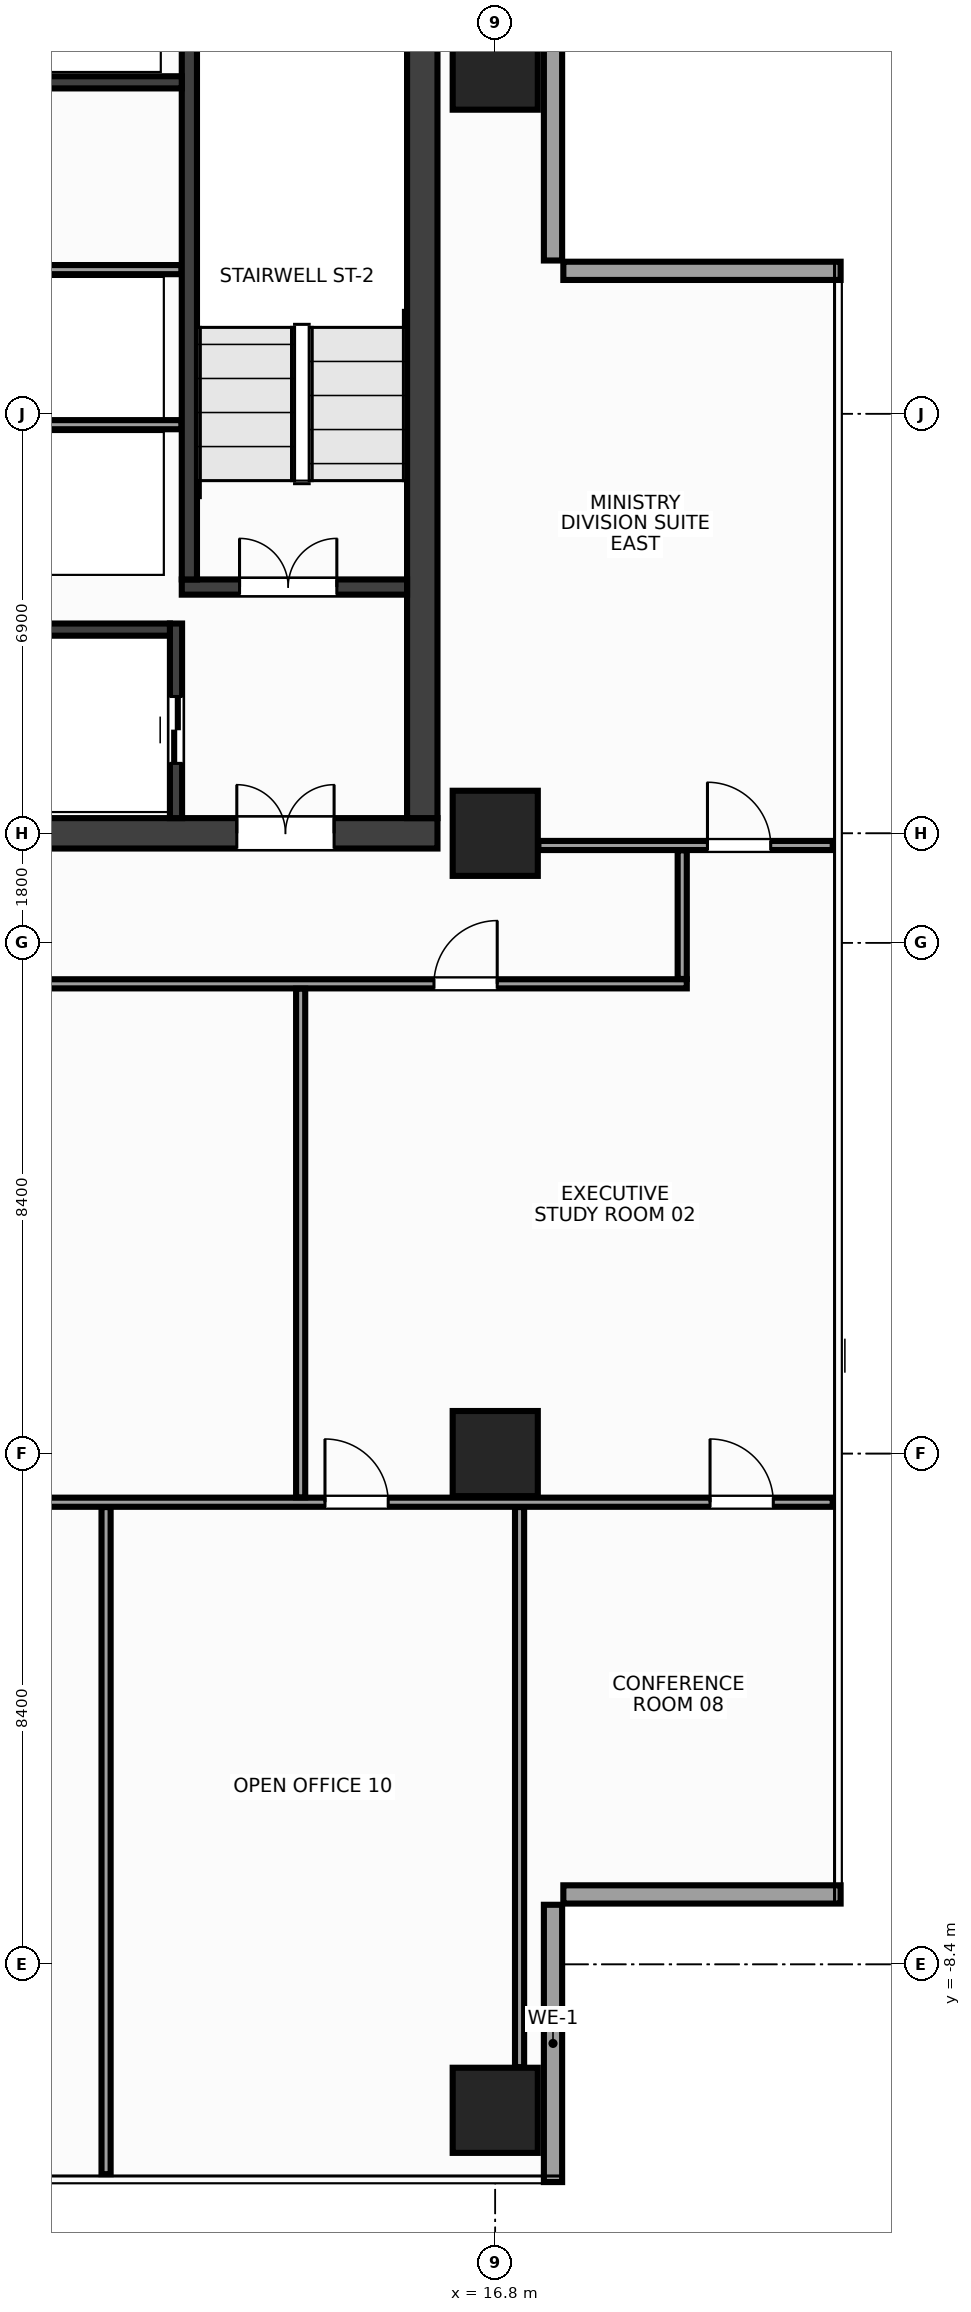
"""IFC4 building model, lengths in metres.
Left out: names, types, materials, properties, quantities, classifications, styles, units other than length and angle.
Written with IfcOpenShell. Run it as: python <this file> out.ifc"""

import sys

from ifc_helpers import new_model, si_unit, direction, frame, frame_2d, origin, origin_2d, place, context, subcontext, project, spatial, rectangle, extrude, source, transform, mapped, element, fill, save


model = new_model("IFC4")
c1 = context("Model", 3, precision=1e-05, world=origin(), true_north=direction((0.0, 1.0)))
c2 = subcontext(c1, "Body", "Model", "MODEL_VIEW")
j1 = project(units=[si_unit("LENGTHUNIT", "METRE"), si_unit("PLANEANGLEUNIT", "RADIAN")], contexts=[c1])
p1 = place(None, origin())
s1 = spatial("IfcSite", under=j1, at=p1, CompositionType="ELEMENT")
p2 = place(p1, origin())
s2 = spatial("IfcBuilding", under=s1, at=p2, CompositionType="ELEMENT")
p3 = place(p2, frame((0.0, 0.0, 250.4)))
s3 = spatial("IfcBuildingStorey", under=s2, at=p3, CompositionType="ELEMENT", Elevation=250.4)
m1 = source(origin(), c2, "Body", "SweptSolid", [
    extrude(rectangle(XDim=31.7, YDim=0.5, at=frame_2d((15.85, 0.0))), origin(), (0.0, 0.0, 1.0), 3.6),
])
p4 = place(p3, frame((-15.85, 10.2, 0.0), z_axis=(0.0, 0.0, 1.0), x_axis=(1.0, 0.0, 0.0)))
e1 = element("IfcWall", 1, at=p4, inside=s3, PredefinedType="SHEAR", context=c2, shape_type="MappedRepresentation", body=[
    mapped(m1, transform((0.0, 0.0, 0.0), x_axis=(1.0, 0.0, 0.0), y_axis=(0.0, 1.0, 0.0), z_axis=(0.0, 0.0, 1.0), scale=1.0)),
])
p5 = place(p4, frame((1.7, 0.0, 0.0)))
e2 = element("IfcOpeningElement", 2, at=p5, cuts=e1, PredefinedType="OPENING", context=c2, shape_type="SweptSolid", body=[
    extrude(rectangle(XDim=1.6, YDim=2.15, at=frame_2d((0.8, 1.075))), frame((0.0, 0.262, 0.0), z_axis=(0.0, -1.0, 0.0), x_axis=(1.0, 0.0, 0.0)), (0.0, 0.0, 1.0), 0.524),
])
p6 = place(p4, frame((28.4, 0.0, 0.0)))
e3 = element("IfcOpeningElement", 3, at=p6, cuts=e1, PredefinedType="OPENING", context=c2, shape_type="SweptSolid", body=[
    extrude(rectangle(XDim=1.6, YDim=2.15, at=frame_2d((0.8, 1.075))), frame((0.0, 0.262, 0.0), z_axis=(0.0, -1.0, 0.0), x_axis=(1.0, 0.0, 0.0)), (0.0, 0.0, 1.0), 0.524),
])
p7 = place(p4, frame((15.1, 0.0, 0.0)))
e4 = element("IfcOpeningElement", 4, at=p7, cuts=e1, PredefinedType="OPENING", context=c2, shape_type="SweptSolid", body=[
    extrude(rectangle(XDim=1.5, YDim=2.2, at=frame_2d((0.75, 1.1))), frame((0.0, 0.262, 0.0), z_axis=(0.0, -1.0, 0.0), x_axis=(1.0, 0.0, 0.0)), (0.0, 0.0, 1.0), 0.524),
])
m2 = source(origin(), c2, "Body", "SweptSolid", [
    extrude(rectangle(XDim=13.1, YDim=0.5, at=frame_2d((6.55, 0.0))), origin(), (0.0, 0.0, 1.0), 3.6),
])
p8 = place(p3, frame((15.6, 10.45, 0.0), z_axis=(0.0, 0.0, 1.0), x_axis=(0.0, 1.0, 0.0)))
e5 = element("IfcWall", 5, at=p8, inside=s3, PredefinedType="SHEAR", context=c2, shape_type="MappedRepresentation", body=[
    mapped(m2, transform((0.0, 0.0, 0.0), x_axis=(1.0, 0.0, 0.0), y_axis=(0.0, 1.0, 0.0), z_axis=(0.0, 0.0, 1.0), scale=1.0)),
])
m3 = source(origin(), c2, "Body", "SweptSolid", [
    extrude(rectangle(XDim=3.705, YDim=0.25, at=frame_2d((1.853, 0.0))), origin(), (0.0, 0.0, 1.0), 3.6),
])
p9 = place(p3, frame((11.645, 14.25, 0.0), z_axis=(0.0, 0.0, 1.0), x_axis=(1.0, 0.0, 0.0)))
e6 = element("IfcWall", 6, at=p9, inside=s3, PredefinedType="SHEAR", context=c2, shape_type="MappedRepresentation", body=[
    mapped(m3, transform((0.0, 0.0, 0.0), x_axis=(1.0, 0.0, 0.0), y_axis=(0.0, 1.0, 0.0), z_axis=(0.0, 0.0, 1.0), scale=1.0)),
])
p10 = place(p9, frame((0.95, 0.0, 0.0)))
e7 = element("IfcOpeningElement", 7, at=p10, cuts=e6, PredefinedType="OPENING", context=c2, shape_type="SweptSolid", body=[
    extrude(rectangle(XDim=1.6, YDim=2.15, at=frame_2d((0.8, 1.075))), frame((0.0, 0.137, 0.0), z_axis=(0.0, -1.0, 0.0), x_axis=(1.0, 0.0, 0.0)), (0.0, 0.0, 1.0), 0.274),
])
m4 = source(origin(), c2, "Body", "SweptSolid", [
    extrude(rectangle(XDim=9.175, YDim=0.25, at=frame_2d((4.587, 0.0))), origin(), (0.0, 0.0, 1.0), 3.6),
])
p11 = place(p3, frame((11.77, 14.375, 0.0), z_axis=(0.0, 0.0, 1.0), x_axis=(0.0, 1.0, 0.0)))
e8 = element("IfcWall", 8, at=p11, inside=s3, PredefinedType="SHEAR", context=c2, shape_type="MappedRepresentation", body=[
    mapped(m4, transform((0.0, 0.0, 0.0), x_axis=(1.0, 0.0, 0.0), y_axis=(0.0, 1.0, 0.0), z_axis=(0.0, 0.0, 1.0), scale=1.0)),
])
m5 = source(origin(), c2, "Body", "SweptSolid", [
    extrude(rectangle(XDim=3.2, YDim=0.2, at=frame_2d((1.6, 0.0))), origin(), (0.0, 0.0, 1.0), 3.6),
])
p12 = place(p3, frame((11.55, 10.45, 0.0), z_axis=(0.0, 0.0, 1.0), x_axis=(0.0, 1.0, 0.0)))
e9 = element("IfcWall", 9, at=p12, inside=s3, PredefinedType="SHEAR", context=c2, shape_type="MappedRepresentation", body=[
    mapped(m5, transform((0.0, 0.0, 0.0), x_axis=(1.0, 0.0, 0.0), y_axis=(0.0, 1.0, 0.0), z_axis=(0.0, 0.0, 1.0), scale=1.0)),
])
p13 = place(p12, frame((0.9, 0.0, 0.0)))
e10 = element("IfcOpeningElement", 10, at=p13, cuts=e9, PredefinedType="OPENING", context=c2, shape_type="SweptSolid", body=[
    extrude(rectangle(XDim=1.1, YDim=2.15, at=frame_2d((0.55, 1.075))), frame((0.0, 0.112, 0.0), z_axis=(0.0, -1.0, 0.0), x_axis=(1.0, 0.0, 0.0)), (0.0, 0.0, 1.0), 0.224),
])
m6 = source(origin(), c2, "Body", "SweptSolid", [
    extrude(rectangle(XDim=2.825, YDim=0.2, at=frame_2d((1.413, 0.0))), origin(), (0.0, 0.0, 1.0), 3.6),
])
p14 = place(p3, frame((8.625, 13.55, 0.0), z_axis=(0.0, 0.0, 1.0), x_axis=(1.0, 0.0, 0.0)))
e11 = element("IfcWall", 11, at=p14, inside=s3, PredefinedType="SHEAR", context=c2, shape_type="MappedRepresentation", body=[
    mapped(m6, transform((0.0, 0.0, 0.0), x_axis=(1.0, 0.0, 0.0), y_axis=(0.0, 1.0, 0.0), z_axis=(0.0, 0.0, 1.0), scale=1.0)),
])
m7 = source(origin(), c2, "Body", "SweptSolid", [
    extrude(rectangle(XDim=3.02, YDim=0.2, at=frame_2d((1.51, 0.0))), origin(), (0.0, 0.0, 1.0), 3.6),
])
p15 = place(p3, frame((8.625, 22.55, 0.0), z_axis=(0.0, 0.0, 1.0), x_axis=(1.0, 0.0, 0.0)))
e12 = element("IfcWall", 12, at=p15, inside=s3, PredefinedType="SHEAR", context=c2, shape_type="MappedRepresentation", body=[
    mapped(m7, transform((0.0, 0.0, 0.0), x_axis=(1.0, 0.0, 0.0), y_axis=(0.0, 1.0, 0.0), z_axis=(0.0, 0.0, 1.0), scale=1.0)),
])
m8 = source(origin(), c2, "Body", "SweptSolid", [
    extrude(rectangle(XDim=1.4, YDim=1.4, at=origin_2d()), origin(), (0.0, 0.0, 1.0), 3.6),
])
for number, where, z_axis, x_axis in (
    (13, (16.8, -10.8, 0.0), (0.0, 0.0, 1.0), (1.0, 0.0, 0.0)),
    (14, (16.8, 0.0, 0.0), (0.0, 0.0, 1.0), (1.0, 0.0, 0.0)),
    (15, (16.8, 10.2, 0.0), (0.0, 0.0, 1.0), (1.0, 0.0, 0.0)),
    (16, (16.8, 22.8, 0.0), (0.0, 0.0, 1.0), (1.0, 0.0, 0.0)),
):
    element("IfcColumn", number, at=place(p3, frame(where, z_axis=z_axis, x_axis=x_axis)), inside=s3, PredefinedType="COLUMN", context=c2, shape_type="MappedRepresentation", body=[
        mapped(m8, transform((0.0, 0.0, 0.0), x_axis=(1.0, 0.0, 0.0), y_axis=(0.0, 1.0, 0.0), z_axis=(0.0, 0.0, 1.0), scale=1.0)),
    ])
m9 = source(origin(), c2, "Body", "SweptSolid", [
    extrude(rectangle(XDim=4.56, YDim=0.3, at=frame_2d((2.28, 0.0))), origin(), (0.0, 0.0, 1.0), 2.75),
])
for number, where, z_axis, x_axis in (
    (17, (17.75, -11.98, 0.0), (0.0, 0.0, 1.0), (0.0, 1.0, 0.0)),
    (18, (17.92, -7.25, 0.0), (0.0, 0.0, 1.0), (1.0, 0.0, 0.0)),
    (19, (22.48, 19.45, 0.0), (0.0, 0.0, 1.0), (-1.0, 0.0, 0.0)),
):
    element("IfcWall", number, at=place(p3, frame(where, z_axis=z_axis, x_axis=x_axis)), inside=s3, PredefinedType="STANDARD", context=c2, shape_type="MappedRepresentation", body=[
        mapped(m9, transform((0.0, 0.0, 0.0), x_axis=(1.0, 0.0, 0.0), y_axis=(0.0, 1.0, 0.0), z_axis=(0.0, 0.0, 1.0), scale=1.0)),
    ])
m10 = source(origin(), c2, "Body", "SweptSolid", [
    extrude(rectangle(XDim=4.56, YDim=0.3, at=frame_2d((2.28, 0.0))), origin(), (0.0, 0.0, 1.0), 2.75),
])
p16 = place(p3, frame((17.75, 19.62, 0.0), z_axis=(0.0, 0.0, 1.0), x_axis=(0.0, 1.0, 0.0)))
e20 = element("IfcWall", 20, at=p16, inside=s3, PredefinedType="STANDARD", context=c2, shape_type="MappedRepresentation", body=[
    mapped(m10, transform((0.0, 0.0, 0.0), x_axis=(1.0, 0.0, 0.0), y_axis=(0.0, 1.0, 0.0), z_axis=(0.0, 0.0, 1.0), scale=1.0)),
])
m11 = source(origin(), c2, "Body", "SweptSolid", [
    extrude(rectangle(XDim=3.01, YDim=0.15, at=frame_2d((1.505, 0.0))), origin(), (0.0, 0.0, 1.0), 3.37),
])
for number, where, z_axis, x_axis in (
    (21, (8.63, 16.92, 0.0), (0.0, 0.0, 1.0), (1.0, 0.0, 0.0)),
    (22, (8.63, 19.47, 0.0), (0.0, 0.0, 1.0), (1.0, 0.0, 0.0)),
):
    element("IfcWall", number, at=place(p3, frame(where, z_axis=z_axis, x_axis=x_axis)), inside=s3, PredefinedType="PARTITIONING", context=c2, shape_type="MappedRepresentation", body=[
        mapped(m11, transform((0.0, 0.0, 0.0), x_axis=(1.0, 0.0, 0.0), y_axis=(0.0, 1.0, 0.0), z_axis=(0.0, 0.0, 1.0), scale=1.0)),
    ])
m12 = source(origin(), c2, "Body", "SweptSolid", [
    extrude(rectangle(XDim=4.84, YDim=0.15, at=frame_2d((2.42, 0.0))), origin(), (0.0, 0.0, 1.0), 3.37),
])
p17 = place(p3, frame((17.51, 10.0, 0.0), z_axis=(0.0, 0.0, 1.0), x_axis=(1.0, 0.0, 0.0)))
e23 = element("IfcWall", 23, at=p17, inside=s3, PredefinedType="PARTITIONING", context=c2, shape_type="MappedRepresentation", body=[
    mapped(m12, transform((0.0, 0.0, 0.0), x_axis=(1.0, 0.0, 0.0), y_axis=(0.0, 1.0, 0.0), z_axis=(0.0, 0.0, 1.0), scale=1.0)),
])
p18 = place(p17, frame((2.78, 0.0, 0.0)))
e24 = element("IfcOpeningElement", 24, at=p18, cuts=e23, PredefinedType="OPENING", context=c2, shape_type="SweptSolid", body=[
    extrude(rectangle(XDim=1.04, YDim=2.2, at=frame_2d((0.52, 1.1))), frame((0.0, 0.087, 0.0), z_axis=(0.0, -1.0, 0.0), x_axis=(1.0, 0.0, 0.0)), (0.0, 0.0, 1.0), 0.174),
])
m13 = source(origin(), c2, "Body", "SweptSolid", [
    extrude(rectangle(XDim=21.9, YDim=0.15, at=frame_2d((10.95, 0.0))), origin(), (0.0, 0.0, 1.0), 2.755),
])
p19 = place(p3, frame((-1.95, 7.725, 0.0), z_axis=(0.0, 0.0, 1.0), x_axis=(1.0, 0.0, 0.0)))
e25 = element("IfcWall", 25, at=p19, inside=s3, PredefinedType="PARTITIONING", context=c2, shape_type="MappedRepresentation", body=[
    mapped(m13, transform((0.0, 0.0, 0.0), x_axis=(1.0, 0.0, 0.0), y_axis=(0.0, 1.0, 0.0), z_axis=(0.0, 0.0, 1.0), scale=1.0)),
])
p20 = place(p19, frame((17.742, 0.0, 0.0)))
e26 = element("IfcOpeningElement", 26, at=p20, cuts=e25, PredefinedType="OPENING", context=c2, shape_type="SweptSolid", body=[
    extrude(rectangle(XDim=1.04, YDim=2.2, at=frame_2d((0.52, 1.1))), frame((0.0, 0.087, 0.0), z_axis=(0.0, -1.0, 0.0), x_axis=(1.0, 0.0, 0.0)), (0.0, 0.0, 1.0), 0.174),
])
p21 = place(p19, frame((1.877, 0.0, 0.0)))
e27 = element("IfcOpeningElement", 27, at=p21, cuts=e25, PredefinedType="OPENING", context=c2, shape_type="SweptSolid", body=[
    extrude(rectangle(XDim=1.04, YDim=2.2, at=frame_2d((0.52, 1.1))), frame((0.0, 0.087, 0.0), z_axis=(0.0, -1.0, 0.0), x_axis=(1.0, 0.0, 0.0)), (0.0, 0.0, 1.0), 0.174),
])
p22 = place(p19, frame((9.63, 0.0, 0.0)))
e28 = element("IfcOpeningElement", 28, at=p22, cuts=e25, PredefinedType="OPENING", context=c2, shape_type="SweptSolid", body=[
    extrude(rectangle(XDim=1.04, YDim=2.2, at=frame_2d((0.52, 1.1))), frame((0.0, 0.087, 0.0), z_axis=(0.0, -1.0, 0.0), x_axis=(1.0, 0.0, 0.0)), (0.0, 0.0, 1.0), 0.174),
])
m14 = source(origin(), c2, "Body", "SweptSolid", [
    extrude(rectangle(XDim=2.115, YDim=0.15, at=frame_2d((1.058, 0.0))), origin(), (0.0, 0.0, 1.0), 3.37),
])
p23 = place(p3, frame((19.875, 7.805, 0.0), z_axis=(0.0, 0.0, 1.0), x_axis=(0.0, 1.0, 0.0)))
e29 = element("IfcWall", 29, at=p23, inside=s3, PredefinedType="PARTITIONING", context=c2, shape_type="MappedRepresentation", body=[
    mapped(m14, transform((0.0, 0.0, 0.0), x_axis=(1.0, 0.0, 0.0), y_axis=(0.0, 1.0, 0.0), z_axis=(0.0, 0.0, 1.0), scale=1.0)),
])
m15 = source(origin(), c2, "Body", "SweptSolid", [
    extrude(rectangle(XDim=24.295, YDim=0.15, at=frame_2d((12.147, 0.0))), origin(), (0.0, 0.0, 1.0), 2.755),
])
p24 = place(p3, frame((-1.945, -0.8, 0.0), z_axis=(0.0, 0.0, 1.0), x_axis=(1.0, 0.0, 0.0)))
e30 = element("IfcWall", 30, at=p24, inside=s3, PredefinedType="PARTITIONING", context=c2, shape_type="MappedRepresentation", body=[
    mapped(m15, transform((0.0, 0.0, 0.0), x_axis=(1.0, 0.0, 0.0), y_axis=(0.0, 1.0, 0.0), z_axis=(0.0, 0.0, 1.0), scale=1.0)),
])
p25 = place(p24, frame((22.278, 0.0, 0.0)))
e31 = element("IfcOpeningElement", 31, at=p25, cuts=e30, PredefinedType="OPENING", context=c2, shape_type="SweptSolid", body=[
    extrude(rectangle(XDim=1.04, YDim=2.2, at=frame_2d((0.52, 1.1))), frame((0.0, 0.087, 0.0), z_axis=(0.0, -1.0, 0.0), x_axis=(1.0, 0.0, 0.0)), (0.0, 0.0, 1.0), 0.174),
])
p26 = place(p24, frame((15.945, 0.0, 0.0)))
e32 = element("IfcOpeningElement", 32, at=p26, cuts=e30, PredefinedType="OPENING", context=c2, shape_type="SweptSolid", body=[
    extrude(rectangle(XDim=1.04, YDim=2.2, at=frame_2d((0.52, 1.1))), frame((0.0, 0.087, 0.0), z_axis=(0.0, -1.0, 0.0), x_axis=(1.0, 0.0, 0.0)), (0.0, 0.0, 1.0), 0.174),
])
m16 = source(origin(), c2, "Body", "SweptSolid", [
    extrude(rectangle(XDim=8.365, YDim=0.15, at=frame_2d((4.183, 0.0))), origin(), (0.0, 0.0, 1.0), 2.655),
])
p27 = place(p3, frame((13.6, -0.72, 0.0), z_axis=(0.0, 0.0, 1.0), x_axis=(0.0, 1.0, 0.0)))
e33 = element("IfcWall", 33, at=p27, inside=s3, PredefinedType="PARTITIONING", context=c2, shape_type="MappedRepresentation", body=[
    mapped(m16, transform((0.0, 0.0, 0.0), x_axis=(1.0, 0.0, 0.0), y_axis=(0.0, 1.0, 0.0), z_axis=(0.0, 0.0, 1.0), scale=1.0)),
])
m17 = source(origin(), c2, "Body", "SweptSolid", [
    extrude(rectangle(XDim=10.97, YDim=0.15, at=frame_2d((5.485, 0.0))), origin(), (0.0, 0.0, 1.0), 2.905),
])
p28 = place(p3, frame((10.4, -11.85, 0.0), z_axis=(0.0, 0.0, 1.0), x_axis=(0.0, 1.0, 0.0)))
e34 = element("IfcWall", 34, at=p28, inside=s3, PredefinedType="PARTITIONING", context=c2, shape_type="MappedRepresentation", body=[
    mapped(m17, transform((0.0, 0.0, 0.0), x_axis=(1.0, 0.0, 0.0), y_axis=(0.0, 1.0, 0.0), z_axis=(0.0, 0.0, 1.0), scale=1.0)),
])
m18 = source(origin(), c2, "Body", "SweptSolid", [
    extrude(rectangle(XDim=9.21, YDim=0.15, at=frame_2d((4.605, 0.0))), origin(), (0.0, 0.0, 1.0), 3.37),
])
p29 = place(p3, frame((17.2, -10.09, 0.0), z_axis=(0.0, 0.0, 1.0), x_axis=(0.0, 1.0, 0.0)))
e35 = element("IfcWall", 35, at=p29, inside=s3, PredefinedType="PARTITIONING", context=c2, shape_type="MappedRepresentation", body=[
    mapped(m18, transform((0.0, 0.0, 0.0), x_axis=(1.0, 0.0, 0.0), y_axis=(0.0, 1.0, 0.0), z_axis=(0.0, 0.0, 1.0), scale=1.0)),
])
m19 = source(origin(), c2, "Body", "SweptSolid", [
    extrude(rectangle(XDim=1.6, YDim=2.15, at=frame_2d((0.8, 1.075))), frame((0.0, 0.025, 0.0), z_axis=(0.0, -1.0, 0.0), x_axis=(1.0, 0.0, 0.0)), (0.0, 0.0, 1.0), 0.05),
])
p30 = place(p10, origin())
e36 = element("IfcDoor", 36, at=p30, inside=s3, OperationType="DOUBLE_DOOR_SINGLE_SWING", PredefinedType="DOOR", context=c2, shape_type="MappedRepresentation", body=[
    mapped(m19, transform((0.0, 0.0, 0.0), x_axis=(1.0, 0.0, 0.0), y_axis=(0.0, 1.0, 0.0), z_axis=(0.0, 0.0, 1.0), scale=1.0)),
])
fill(e7, e36)
p31 = place(p6, origin())
e37 = element("IfcDoor", 37, at=p31, inside=s3, OperationType="DOUBLE_DOOR_SINGLE_SWING", PredefinedType="DOOR", context=c2, shape_type="MappedRepresentation", body=[
    mapped(m19, transform((0.0, 0.0, 0.0), x_axis=(1.0, 0.0, 0.0), y_axis=(0.0, 1.0, 0.0), z_axis=(0.0, 0.0, 1.0), scale=1.0)),
])
fill(e3, e37)
m20 = source(origin(), c2, "Body", "SweptSolid", [
    extrude(rectangle(XDim=1.1, YDim=2.15, at=frame_2d((0.55, 1.075))), frame((0.0, 0.025, 0.0), z_axis=(0.0, -1.0, 0.0), x_axis=(1.0, 0.0, 0.0)), (0.0, 0.0, 1.0), 0.05),
])
p32 = place(p13, origin())
e38 = element("IfcDoor", 38, at=p32, inside=s3, OperationType="DOUBLE_DOOR_SLIDING", PredefinedType="DOOR", context=c2, shape_type="MappedRepresentation", body=[
    mapped(m20, transform((0.0, 0.0, 0.0), x_axis=(1.0, 0.0, 0.0), y_axis=(0.0, 1.0, 0.0), z_axis=(0.0, 0.0, 1.0), scale=1.0)),
])
fill(e10, e38)
m21 = source(origin(), c2, "Body", "SweptSolid", [
    extrude(rectangle(XDim=1.04, YDim=2.2, at=frame_2d((0.52, 1.1))), frame((0.0, 0.025, 0.0), z_axis=(0.0, -1.0, 0.0), x_axis=(1.0, 0.0, 0.0)), (0.0, 0.0, 1.0), 0.05),
])
p33 = place(p20, origin())
e39 = element("IfcDoor", 39, at=p33, inside=s3, OperationType="SINGLE_SWING_RIGHT", PredefinedType="DOOR", context=c2, shape_type="MappedRepresentation", body=[
    mapped(m21, transform((0.0, 0.0, 0.0), x_axis=(1.0, 0.0, 0.0), y_axis=(0.0, 1.0, 0.0), z_axis=(0.0, 0.0, 1.0), scale=1.0)),
])
fill(e26, e39)
p34 = place(p18, origin())
e40 = element("IfcDoor", 40, at=p34, inside=s3, OperationType="SINGLE_SWING_LEFT", PredefinedType="DOOR", context=c2, shape_type="MappedRepresentation", body=[
    mapped(m21, transform((0.0, 0.0, 0.0), x_axis=(1.0, 0.0, 0.0), y_axis=(0.0, 1.0, 0.0), z_axis=(0.0, 0.0, 1.0), scale=1.0)),
])
fill(e24, e40)
p35 = place(p25, origin())
e41 = element("IfcDoor", 41, at=p35, inside=s3, OperationType="SINGLE_SWING_LEFT", PredefinedType="DOOR", context=c2, shape_type="MappedRepresentation", body=[
    mapped(m21, transform((0.0, 0.0, 0.0), x_axis=(1.0, 0.0, 0.0), y_axis=(0.0, 1.0, 0.0), z_axis=(0.0, 0.0, 1.0), scale=1.0)),
])
fill(e31, e41)
p36 = place(p26, origin())
e42 = element("IfcDoor", 42, at=p36, inside=s3, OperationType="SINGLE_SWING_LEFT", PredefinedType="DOOR", context=c2, shape_type="MappedRepresentation", body=[
    mapped(m21, transform((0.0, 0.0, 0.0), x_axis=(1.0, 0.0, 0.0), y_axis=(0.0, 1.0, 0.0), z_axis=(0.0, 0.0, 1.0), scale=1.0)),
])
fill(e32, e42)
save(model, sys.argv[1])
